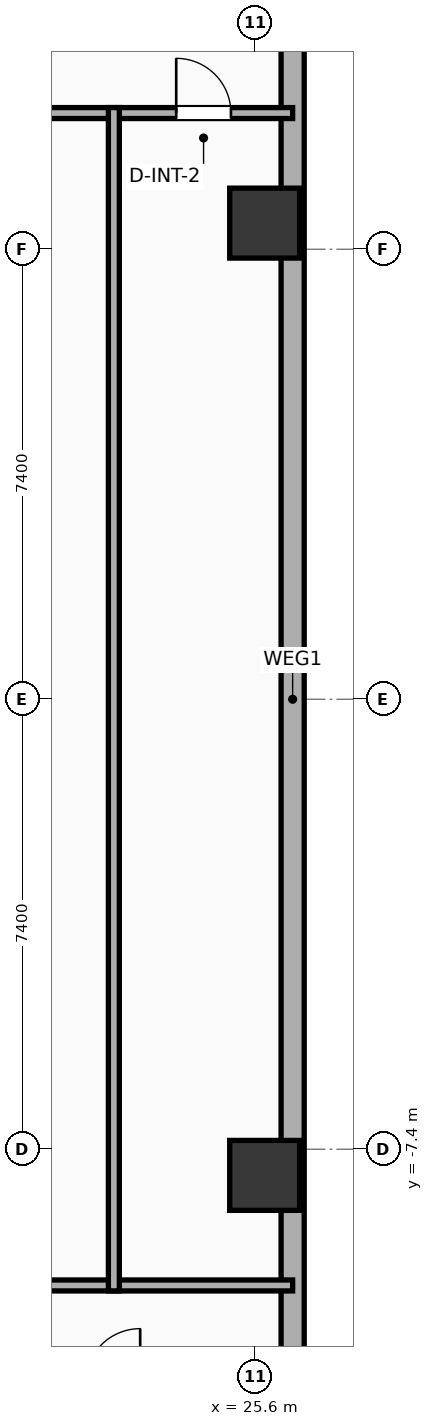
"""IFC4 building model, lengths in metres.
Left out: names, types, materials, properties, quantities, classifications, styles, units other than length and angle.
Written with IfcOpenShell. Run it as: python <this file> out.ifc"""

import sys

from ifc_helpers import new_model, si_unit, direction, frame, frame_2d, origin, origin_2d, place, context, subcontext, project, spatial, rectangle, hollow_rectangle, extrude, element, fill, save


model = new_model("IFC4")
c1 = context("Model", 3, precision=1e-05, world=origin(), true_north=direction((0.0, 1.0)))
c2 = subcontext(c1, "Body", "Model", "MODEL_VIEW")
j1 = project(units=[si_unit("LENGTHUNIT", "METRE"), si_unit("PLANEANGLEUNIT", "RADIAN")], contexts=[c1])
p1 = place(None, origin())
s1 = spatial("IfcSite", under=j1, at=p1, CompositionType="ELEMENT")
p2 = place(p1, origin())
s2 = spatial("IfcBuilding", under=s1, at=p2, CompositionType="ELEMENT")
p3 = place(p2, frame((0.0, 0.0, 76.7)))
s3 = spatial("IfcBuildingStorey", under=s2, at=p3, CompositionType="ELEMENT", Elevation=76.7)
for number, where, z_axis, x_axis in (
    (1, (25.75, -7.83, 0.0), (0.0, 0.0, 1.0), (1.0, 0.0, 0.0)),
    (2, (25.75, 7.83, 0.0), (0.0, 0.0, 1.0), (1.0, 0.0, 0.0)),
):
    element("IfcColumn", number, at=place(p3, frame(where, z_axis=z_axis, x_axis=x_axis)), inside=s3, PredefinedType="COLUMN", context=c2, shape_type="SweptSolid", body=[
        extrude(hollow_rectangle(XDim=1.15, YDim=1.15, WallThickness=0.04, at=origin_2d()), origin(), (0.0, 0.0, 1.0), 3.9),
    ])
p4 = place(p3, frame((26.21, 18.381, 0.0), z_axis=(0.0, 0.0, 1.0), x_axis=(0.0, -1.0, 0.0)))
e3 = element("IfcWall", 3, at=p4, inside=s3, PredefinedType="ELEMENTEDWALL", context=c2, shape_type="SweptSolid", body=[
    extrude(rectangle(XDim=36.763, YDim=0.38, at=frame_2d((18.381, 0.0))), origin(), (0.0, 0.0, 1.0), 3.6),
])
p5 = place(p3, frame((9.88, 9.64, 0.0), z_axis=(0.0, 0.0, 1.0), x_axis=(1.0, 0.0, 0.0)))
e4 = element("IfcWall", 4, at=p5, inside=s3, PredefinedType="PARTITIONING", context=c2, shape_type="SweptSolid", body=[
    extrude(rectangle(XDim=16.33, YDim=0.18, at=frame_2d((8.165, 0.0))), origin(), (0.0, 0.0, 1.0), 3.6),
])
p6 = place(p5, frame((14.415, 0.0, 0.0)))
e5 = element("IfcOpeningElement", 5, at=p6, cuts=e4, PredefinedType="OPENING", context=c2, shape_type="SweptSolid", body=[
    extrude(rectangle(XDim=0.9, YDim=2.05, at=frame_2d((0.45, 1.025))), frame((0.0, 0.1, 0.0), z_axis=(0.0, -1.0, 0.0), x_axis=(1.0, 0.0, 0.0)), (0.0, 0.0, 1.0), 0.2),
])
p7 = place(p3, frame((9.88, -9.64, 0.0), z_axis=(0.0, 0.0, 1.0), x_axis=(1.0, 0.0, 0.0)))
e6 = element("IfcWall", 6, at=p7, inside=s3, PredefinedType="PARTITIONING", context=c2, shape_type="SweptSolid", body=[
    extrude(rectangle(XDim=16.33, YDim=0.18, at=frame_2d((8.165, 0.0))), origin(), (0.0, 0.0, 1.0), 3.6),
])
p8 = place(p3, frame((23.27, -9.73, 0.0), z_axis=(0.0, 0.0, 1.0), x_axis=(0.0, 1.0, 0.0)))
e7 = element("IfcWall", 7, at=p8, inside=s3, PredefinedType="PARTITIONING", context=c2, shape_type="SweptSolid", body=[
    extrude(rectangle(XDim=19.46, YDim=0.18, at=frame_2d((9.73, 0.0))), origin(), (0.0, 0.0, 1.0), 3.6),
])
p9 = place(p6, origin())
e8 = element("IfcDoor", 8, at=p9, inside=s3, OperationType="SINGLE_SWING_LEFT", PredefinedType="DOOR", context=c2, shape_type="SweptSolid", body=[
    extrude(rectangle(XDim=0.9, YDim=2.05, at=frame_2d((0.45, 1.025))), frame((0.0, 0.025, 0.0), z_axis=(0.0, -1.0, 0.0), x_axis=(1.0, 0.0, 0.0)), (0.0, 0.0, 1.0), 0.05),
])
fill(e5, e8)
save(model, sys.argv[1])
